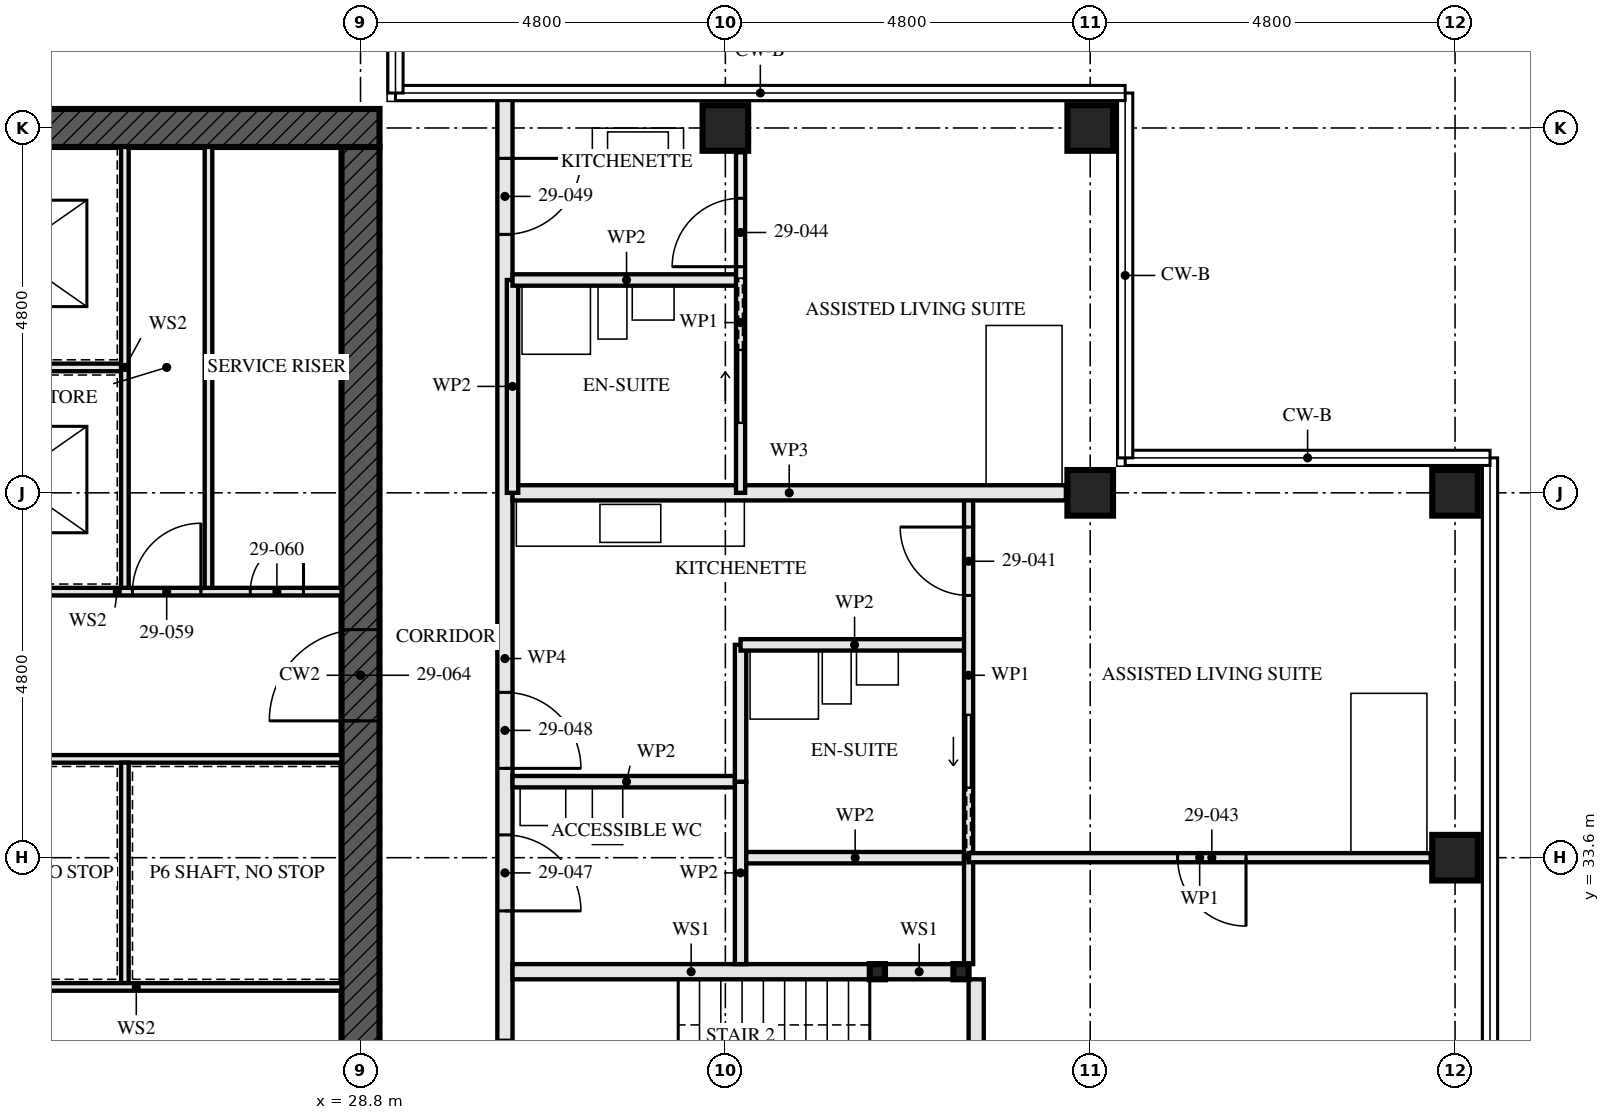
"""IFC4 building model, lengths in metres.
Left out: names, types, materials, properties, quantities, classifications, styles, units other than length and angle.
Written with IfcOpenShell. Run it as: python <this file> out.ifc"""

import sys

from ifc_helpers import new_model, si_unit, direction, frame, frame_2d, origin, origin_2d, place, context, subcontext, project, spatial, rectangle, hollow_rectangle, extrude, element, fill, save


model = new_model("IFC4")
c1 = context("Model", 3, precision=1e-05, world=origin(), true_north=direction((0.0, 1.0)))
c2 = subcontext(c1, "Body", "Model", "MODEL_VIEW")
j1 = project(units=[si_unit("LENGTHUNIT", "METRE"), si_unit("PLANEANGLEUNIT", "RADIAN")], contexts=[c1])
p1 = place(None, origin())
s1 = spatial("IfcSite", under=j1, at=p1, CompositionType="ELEMENT")
p2 = place(p1, origin())
s2 = spatial("IfcBuilding", under=s1, at=p2, CompositionType="ELEMENT")
p3 = place(p2, frame((0.0, 0.0, 108.5)))
s3 = spatial("IfcBuildingStorey", under=s2, at=p3, CompositionType="ELEMENT", Elevation=108.5)
for number, where, z_axis, x_axis in (
    (1, (33.6, 43.2, 0.0), (0.0, 0.0, 1.0), (0.0, 1.0, 0.0)),
    (2, (38.4, 38.4, 0.0), (0.0, 0.0, 1.0), (0.0, 1.0, 0.0)),
    (3, (38.4, 43.2, 0.0), (0.0, 0.0, 1.0), (0.0, 1.0, 0.0)),
    (4, (43.2, 33.6, 0.0), (0.0, 0.0, 1.0), (1.0, 0.0, 0.0)),
    (5, (43.2, 38.4, 0.0), (0.0, 0.0, 1.0), (0.0, 1.0, 0.0)),
):
    element("IfcColumn", number, at=place(p3, frame(where, z_axis=z_axis, x_axis=x_axis)), inside=s3, PredefinedType="COLUMN", context=c2, shape_type="SweptSolid", body=[
        extrude(hollow_rectangle(XDim=0.6, YDim=0.6, WallThickness=0.08, at=origin_2d()), origin(), (0.0, 0.0, 1.0), 3.5),
    ])
p4 = place(p3, frame((29.05, 43.2, -0.17), z_axis=(0.0, 0.0, 1.0), x_axis=(-1.0, 0.0, 0.0)))
e6 = element("IfcWall", 6, at=p4, inside=s3, PredefinedType="SHEAR", context=c2, shape_type="SweptSolid", body=[
    extrude(rectangle(XDim=14.9, YDim=0.5, at=frame_2d((7.45, 0.0))), origin(), (0.0, 0.0, 1.0), 3.5),
])
p5 = place(p4, frame((6.85, 0.0, 0.17)))
e7 = element("IfcOpeningElement", 7, at=p5, cuts=e6, PredefinedType="OPENING", context=c2, shape_type="SweptSolid", body=[
    extrude(rectangle(XDim=1.2, YDim=2.1, at=frame_2d((0.6, 1.05))), frame((0.0, 0.26, 0.0), z_axis=(0.0, -1.0, 0.0), x_axis=(1.0, 0.0, 0.0)), (0.0, 0.0, 1.0), 0.521),
])
p6 = place(p3, frame((28.8, 29.05, -0.17), z_axis=(0.0, 0.0, 1.0), x_axis=(0.0, 1.0, 0.0)))
e8 = element("IfcWall", 8, at=p6, inside=s3, PredefinedType="SHEAR", context=c2, shape_type="SweptSolid", body=[
    extrude(rectangle(XDim=13.9, YDim=0.5, at=frame_2d((6.95, 0.0))), origin(), (0.0, 0.0, 1.0), 3.5),
])
p7 = place(p6, frame((6.35, 0.0, 0.17)))
e9 = element("IfcOpeningElement", 9, at=p7, cuts=e8, PredefinedType="OPENING", context=c2, shape_type="SweptSolid", body=[
    extrude(rectangle(XDim=1.2, YDim=2.1, at=frame_2d((0.6, 1.05))), frame((0.0, 0.26, 0.0), z_axis=(0.0, -1.0, 0.0), x_axis=(1.0, 0.0, 0.0)), (0.0, 0.0, 1.0), 0.521),
])
for number, where, z_axis, x_axis in (
    (10, (36.7, 32.1, 0.0), (0.0, 0.0, 1.0), (1.0, 0.0, 0.0)),
    (11, (35.6, 32.1, 0.0), (0.0, 0.0, 1.0), (1.0, 0.0, 0.0)),
):
    element("IfcColumn", number, at=place(p3, frame(where, z_axis=z_axis, x_axis=x_axis)), inside=s3, PredefinedType="COLUMN", context=c2, shape_type="SweptSolid", body=[
        extrude(hollow_rectangle(XDim=0.2, YDim=0.2, WallThickness=0.008, at=origin_2d()), origin(), (0.0, 0.0, 1.0), 3.33),
    ])
p8 = place(p3, frame((36.6, 32.1, 0.0), z_axis=(0.0, 0.0, 1.0), x_axis=(-1.0, 0.0, 0.0)))
e12 = element("IfcWall", 12, at=p8, inside=s3, PredefinedType="SOLIDWALL", context=c2, shape_type="SweptSolid", body=[
    extrude(rectangle(XDim=0.9, YDim=0.2, at=frame_2d((0.45, 0.0))), origin(), (0.0, 0.0, 1.0), 2.99),
])
p9 = place(p3, frame((35.5, 32.1, 0.0), z_axis=(0.0, 0.0, 1.0), x_axis=(-1.0, 0.0, 0.0)))
e13 = element("IfcWall", 13, at=p9, inside=s3, PredefinedType="SOLIDWALL", context=c2, shape_type="SweptSolid", body=[
    extrude(rectangle(XDim=4.7, YDim=0.2, at=frame_2d((2.35, 0.0))), origin(), (0.0, 0.0, 1.0), 2.99),
])
p10 = place(p3, frame((36.9, 29.4, 0.0), z_axis=(0.0, 0.0, 1.0), x_axis=(0.0, 1.0, 0.0)))
e14 = element("IfcWall", 14, at=p10, inside=s3, PredefinedType="SOLIDWALL", context=c2, shape_type="SweptSolid", body=[
    extrude(rectangle(XDim=2.6, YDim=0.2, at=frame_2d((1.3, 0.0))), origin(), (0.0, 0.0, 1.0), 3.33),
])
p11 = place(p3, frame((33.8, 32.2, 0.0), z_axis=(0.0, 0.0, 1.0), x_axis=(0.0, 1.0, 0.0)))
e15 = element("IfcWall", 15, at=p11, inside=s3, PredefinedType="PARTITIONING", context=c2, shape_type="SweptSolid", body=[
    extrude(rectangle(XDim=2.4, YDim=0.15, at=frame_2d((1.2, 0.0))), origin(), (0.0, 0.0, 1.0), 2.55),
])
for number, where, z_axis, x_axis in (
    (16, (33.8, 34.6, 0.0), (0.0, 0.0, 1.0), (-1.0, 0.0, 0.0)),
    (17, (36.8, 36.4, 0.0), (0.0, 0.0, 1.0), (-1.0, 0.0, 0.0)),
):
    element("IfcWall", number, at=place(p3, frame(where, z_axis=z_axis, x_axis=x_axis)), inside=s3, PredefinedType="PARTITIONING", context=c2, shape_type="SweptSolid", body=[
        extrude(rectangle(XDim=3.0, YDim=0.15, at=frame_2d((1.5, 0.0))), origin(), (0.0, 0.0, 1.0), 3.33),
    ])
p12 = place(p3, frame((33.8, 34.6, 0.0), z_axis=(0.0, 0.0, 1.0), x_axis=(0.0, 1.0, 0.0)))
e18 = element("IfcWall", 18, at=p12, inside=s3, PredefinedType="PARTITIONING", context=c2, shape_type="SweptSolid", body=[
    extrude(rectangle(XDim=1.8, YDim=0.15, at=frame_2d((0.9, 0.0))), origin(), (0.0, 0.0, 1.0), 3.33),
])
p13 = place(p3, frame((36.8, 32.2, 0.0), z_axis=(0.0, 0.0, 1.0), x_axis=(0.0, 1.0, 0.0)))
e19 = element("IfcWall", 19, at=p13, inside=s3, PredefinedType="PARTITIONING", context=c2, shape_type="SweptSolid", body=[
    extrude(rectangle(XDim=1.4, YDim=0.12, at=frame_2d((0.7, 0.0))), origin(), (0.0, 0.0, 1.0), 3.33),
])
p14 = place(p3, frame((36.8, 33.6, 0.0), z_axis=(0.0, 0.0, 1.0), x_axis=(0.0, 1.0, 0.0)))
e20 = element("IfcWall", 20, at=p14, inside=s3, PredefinedType="PARTITIONING", context=c2, shape_type="SweptSolid", body=[
    extrude(rectangle(XDim=4.8, YDim=0.12, at=frame_2d((2.4, 0.0))), origin(), (0.0, 0.0, 1.0), 3.33),
])
p15 = place(p14, frame((3.45, 0.0, 0.0)))
e21 = element("IfcOpeningElement", 21, at=p15, cuts=e20, PredefinedType="OPENING", context=c2, shape_type="SweptSolid", body=[
    extrude(rectangle(XDim=0.9, YDim=2.1, at=frame_2d((0.45, 1.05))), frame((0.0, 0.071, 0.0), z_axis=(0.0, -1.0, 0.0), x_axis=(1.0, 0.0, 0.0)), (0.0, 0.0, 1.0), 0.141),
])
p16 = place(p14, frame((0.925, 0.0, 0.0)))
e22 = element("IfcOpeningElement", 22, at=p16, cuts=e20, PredefinedType="OPENING", context=c2, shape_type="SweptSolid", body=[
    extrude(rectangle(XDim=0.95, YDim=2.1, at=frame_2d((0.475, 1.05))), frame((0.0, 0.071, 0.0), z_axis=(0.0, -1.0, 0.0), x_axis=(1.0, 0.0, 0.0)), (0.0, 0.0, 1.0), 0.141),
])
p17 = place(p3, frame((42.88, 33.6, 0.0), z_axis=(0.0, 0.0, 1.0), x_axis=(-1.0, 0.0, 0.0)))
e23 = element("IfcWall", 23, at=p17, inside=s3, PredefinedType="PARTITIONING", context=c2, shape_type="SweptSolid", body=[
    extrude(rectangle(XDim=6.08, YDim=0.12, at=frame_2d((3.04, 0.0))), origin(), (0.0, 0.0, 1.0), 2.55),
])
p18 = place(p17, frame((2.43, 0.0, 0.0)))
e24 = element("IfcOpeningElement", 24, at=p18, cuts=e23, PredefinedType="OPENING", context=c2, shape_type="SweptSolid", body=[
    extrude(rectangle(XDim=0.9, YDim=2.1, at=frame_2d((0.45, 1.05))), frame((0.0, 0.071, 0.0), z_axis=(0.0, -1.0, 0.0), x_axis=(1.0, 0.0, 0.0)), (0.0, 0.0, 1.0), 0.141),
])
p19 = place(p3, frame((38.08, 38.4, 0.0), z_axis=(0.0, 0.0, 1.0), x_axis=(-1.0, 0.0, 0.0)))
e25 = element("IfcWall", 25, at=p19, inside=s3, PredefinedType="PARTITIONING", context=c2, shape_type="SweptSolid", body=[
    extrude(rectangle(XDim=7.28, YDim=0.2, at=frame_2d((3.64, 0.0))), origin(), (0.0, 0.0, 1.0), 2.55),
])
p20 = place(p3, frame((33.8, 41.2, 0.0), z_axis=(0.0, 0.0, 1.0), x_axis=(-1.0, 0.0, 0.0)))
e26 = element("IfcWall", 26, at=p20, inside=s3, PredefinedType="PARTITIONING", context=c2, shape_type="SweptSolid", body=[
    extrude(rectangle(XDim=3.0, YDim=0.15, at=frame_2d((1.5, 0.0))), origin(), (0.0, 0.0, 1.0), 3.33),
])
p21 = place(p3, frame((30.8, 38.4, 0.0), z_axis=(0.0, 0.0, 1.0), x_axis=(0.0, 1.0, 0.0)))
e27 = element("IfcWall", 27, at=p21, inside=s3, PredefinedType="PARTITIONING", context=c2, shape_type="SweptSolid", body=[
    extrude(rectangle(XDim=2.8, YDim=0.15, at=frame_2d((1.4, 0.0))), origin(), (0.0, 0.0, 1.0), 3.33),
])
p22 = place(p3, frame((33.8, 38.4, 0.0), z_axis=(0.0, 0.0, 1.0), x_axis=(0.0, 1.0, 0.0)))
e28 = element("IfcWall", 28, at=p22, inside=s3, PredefinedType="PARTITIONING", context=c2, shape_type="SweptSolid", body=[
    extrude(rectangle(XDim=4.48, YDim=0.12, at=frame_2d((2.24, 0.0))), origin(), (0.0, 0.0, 1.0), 3.33),
])
p23 = place(p22, frame((2.975, 0.0, 0.0)))
e29 = element("IfcOpeningElement", 29, at=p23, cuts=e28, PredefinedType="OPENING", context=c2, shape_type="SweptSolid", body=[
    extrude(rectangle(XDim=0.9, YDim=2.1, at=frame_2d((0.45, 1.05))), frame((0.0, 0.071, 0.0), z_axis=(0.0, -1.0, 0.0), x_axis=(1.0, 0.0, 0.0)), (0.0, 0.0, 1.0), 0.141),
])
p24 = place(p22, frame((0.925, 0.0, 0.0)))
e30 = element("IfcOpeningElement", 30, at=p24, cuts=e28, PredefinedType="OPENING", context=c2, shape_type="SweptSolid", body=[
    extrude(rectangle(XDim=0.95, YDim=2.1, at=frame_2d((0.475, 1.05))), frame((0.0, 0.071, 0.0), z_axis=(0.0, -1.0, 0.0), x_axis=(1.0, 0.0, 0.0)), (0.0, 0.0, 1.0), 0.141),
])
p25 = place(p3, frame((30.7, 28.8, 0.0), z_axis=(0.0, 0.0, 1.0), x_axis=(0.0, 1.0, 0.0)))
e31 = element("IfcWall", 31, at=p25, inside=s3, PredefinedType="PARTITIONING", context=c2, shape_type="SweptSolid", body=[
    extrude(rectangle(XDim=14.84, YDim=0.2, at=frame_2d((7.42, 0.0))), origin(), (0.0, 0.0, 1.0), 2.32),
])
p26 = place(p25, frame((1.4, 0.0, 0.0)))
e32 = element("IfcOpeningElement", 32, at=p26, cuts=e31, PredefinedType="OPENING", context=c2, shape_type="SweptSolid", body=[
    extrude(rectangle(XDim=1.0, YDim=2.1, at=frame_2d((0.5, 1.05))), frame((0.0, 0.111, 0.0), z_axis=(0.0, -1.0, 0.0), x_axis=(1.0, 0.0, 0.0)), (0.0, 0.0, 1.0), 0.221),
])
p27 = place(p25, frame((4.1, 0.0, 0.0)))
e33 = element("IfcOpeningElement", 33, at=p27, cuts=e31, PredefinedType="OPENING", context=c2, shape_type="SweptSolid", body=[
    extrude(rectangle(XDim=1.0, YDim=2.1, at=frame_2d((0.5, 1.05))), frame((0.0, 0.111, 0.0), z_axis=(0.0, -1.0, 0.0), x_axis=(1.0, 0.0, 0.0)), (0.0, 0.0, 1.0), 0.221),
])
p28 = place(p25, frame((5.975, 0.0, 0.0)))
e34 = element("IfcOpeningElement", 34, at=p28, cuts=e31, PredefinedType="OPENING", context=c2, shape_type="SweptSolid", body=[
    extrude(rectangle(XDim=1.0, YDim=2.1, at=frame_2d((0.5, 1.05))), frame((0.0, 0.111, 0.0), z_axis=(0.0, -1.0, 0.0), x_axis=(1.0, 0.0, 0.0)), (0.0, 0.0, 1.0), 0.221),
])
p29 = place(p25, frame((13.0, 0.0, 0.0)))
e35 = element("IfcOpeningElement", 35, at=p29, cuts=e31, PredefinedType="OPENING", context=c2, shape_type="SweptSolid", body=[
    extrude(rectangle(XDim=1.0, YDim=2.1, at=frame_2d((0.5, 1.05))), frame((0.0, 0.111, 0.0), z_axis=(0.0, -1.0, 0.0), x_axis=(1.0, 0.0, 0.0)), (0.0, 0.0, 1.0), 0.221),
])
p30 = place(p3, frame((26.8, 37.15, 0.0), z_axis=(0.0, 0.0, 1.0), x_axis=(0.0, 1.0, 0.0)))
e36 = element("IfcWall", 36, at=p30, inside=s3, PredefinedType="SOLIDWALL", context=c2, shape_type="SweptSolid", body=[
    extrude(rectangle(XDim=5.8, YDim=0.1, at=frame_2d((2.9, 0.0))), origin(), (0.0, 0.0, 1.0), 3.33),
])
p31 = place(p3, frame((23.05, 34.9, 0.0), z_axis=(0.0, 0.0, 1.0), x_axis=(1.0, 0.0, 0.0)))
e37 = element("IfcWall", 37, at=p31, inside=s3, PredefinedType="SOLIDWALL", context=c2, shape_type="SweptSolid", body=[
    extrude(rectangle(XDim=5.5, YDim=0.1, at=frame_2d((2.75, 0.0))), origin(), (0.0, 0.0, 1.0), 3.33),
])
p32 = place(p3, frame((22.65, 37.1, 0.0), z_axis=(0.0, 0.0, 1.0), x_axis=(1.0, 0.0, 0.0)))
e38 = element("IfcWall", 38, at=p32, inside=s3, PredefinedType="SOLIDWALL", context=c2, shape_type="SweptSolid", body=[
    extrude(rectangle(XDim=5.9, YDim=0.1, at=frame_2d((2.95, 0.0))), origin(), (0.0, 0.0, 1.0), 3.33),
])
p33 = place(p32, frame((3.15, 0.0, 0.0)))
e39 = element("IfcOpeningElement", 39, at=p33, cuts=e38, PredefinedType="OPENING", context=c2, shape_type="SweptSolid", body=[
    extrude(rectangle(XDim=0.9, YDim=2.1, at=frame_2d((0.45, 1.05))), frame((0.0, 0.061, 0.0), z_axis=(0.0, -1.0, 0.0), x_axis=(1.0, 0.0, 0.0)), (0.0, 0.0, 1.0), 0.121),
])
p34 = place(p32, frame((4.7, 0.0, 0.0)))
e40 = element("IfcOpeningElement", 40, at=p34, cuts=e38, PredefinedType="OPENING", context=c2, shape_type="SweptSolid", body=[
    extrude(rectangle(XDim=0.7, YDim=2.1, at=frame_2d((0.35, 1.05))), frame((0.0, 0.061, 0.0), z_axis=(0.0, -1.0, 0.0), x_axis=(1.0, 0.0, 0.0)), (0.0, 0.0, 1.0), 0.121),
])
p35 = place(p3, frame((22.75, 40.05, 0.0), z_axis=(0.0, 0.0, 1.0), x_axis=(1.0, 0.0, 0.0)))
e41 = element("IfcWall", 41, at=p35, inside=s3, PredefinedType="SOLIDWALL", context=c2, shape_type="SweptSolid", body=[
    extrude(rectangle(XDim=2.9, YDim=0.1, at=frame_2d((1.45, 0.0))), origin(), (0.0, 0.0, 1.0), 3.33),
])
p36 = place(p3, frame((25.7, 37.15, 0.0), z_axis=(0.0, 0.0, 1.0), x_axis=(0.0, 1.0, 0.0)))
e42 = element("IfcWall", 42, at=p36, inside=s3, PredefinedType="SOLIDWALL", context=c2, shape_type="SweptSolid", body=[
    extrude(rectangle(XDim=5.8, YDim=0.1, at=frame_2d((2.9, 0.0))), origin(), (0.0, 0.0, 1.0), 3.33),
])
p37 = place(p3, frame((25.7, 31.95, 0.0), z_axis=(0.0, 0.0, 1.0), x_axis=(0.0, 1.0, 0.0)))
e43 = element("IfcWall", 43, at=p37, inside=s3, PredefinedType="SOLIDWALL", context=c2, shape_type="SweptSolid", body=[
    extrude(rectangle(XDim=2.9, YDim=0.1, at=frame_2d((1.45, 0.0))), origin(), (0.0, 0.0, 1.0), 3.33),
])
p38 = place(p3, frame((23.15, 31.9, 0.0), z_axis=(0.0, 0.0, 1.0), x_axis=(1.0, 0.0, 0.0)))
e44 = element("IfcWall", 44, at=p38, inside=s3, PredefinedType="SOLIDWALL", context=c2, shape_type="SweptSolid", body=[
    extrude(rectangle(XDim=5.4, YDim=0.1, at=frame_2d((2.7, 0.0))), origin(), (0.0, 0.0, 1.0), 3.33),
])
p39 = place(p3, frame((36.74, 33.6, 0.0), z_axis=(0.0, 0.0, 1.0), x_axis=(-1.0, 0.0, 0.0)))
e45 = element("IfcWall", 45, at=p39, inside=s3, PredefinedType="PARTITIONING", context=c2, shape_type="SweptSolid", body=[
    extrude(rectangle(XDim=2.865, YDim=0.15, at=frame_2d((1.433, 0.0))), origin(), (0.0, 0.0, 1.0), 2.55),
])
p40 = place(p15, origin())
e46 = element("IfcDoor", 46, at=p40, inside=s3, OperationType="SINGLE_SWING_LEFT", PredefinedType="DOOR", context=c2, shape_type="SweptSolid", body=[
    extrude(rectangle(XDim=0.9, YDim=2.1, at=frame_2d((0.45, 1.05))), frame((0.0, 0.022, 0.0), z_axis=(0.0, -1.0, 0.0), x_axis=(1.0, 0.0, 0.0)), (0.0, 0.0, 1.0), 0.044),
])
fill(e21, e46)
p41 = place(p16, origin())
e47 = element("IfcDoor", 47, at=p41, inside=s3, OperationType="SLIDING_TO_RIGHT", PredefinedType="DOOR", context=c2, shape_type="SweptSolid", body=[
    extrude(rectangle(XDim=0.95, YDim=2.1, at=frame_2d((0.475, 1.05))), frame((0.0, 0.022, 0.0), z_axis=(0.0, -1.0, 0.0), x_axis=(1.0, 0.0, 0.0)), (0.0, 0.0, 1.0), 0.044),
])
fill(e22, e47)
p42 = place(p18, origin())
e48 = element("IfcDoor", 48, at=p42, inside=s3, OperationType="SINGLE_SWING_RIGHT", PredefinedType="DOOR", context=c2, shape_type="SweptSolid", body=[
    extrude(rectangle(XDim=0.9, YDim=2.1, at=frame_2d((0.45, 1.05))), frame((0.0, 0.022, 0.0), z_axis=(0.0, -1.0, 0.0), x_axis=(1.0, 0.0, 0.0)), (0.0, 0.0, 1.0), 0.044),
])
fill(e24, e48)
p43 = place(p23, origin())
e49 = element("IfcDoor", 49, at=p43, inside=s3, OperationType="SINGLE_SWING_RIGHT", PredefinedType="DOOR", context=c2, shape_type="SweptSolid", body=[
    extrude(rectangle(XDim=0.9, YDim=2.1, at=frame_2d((0.45, 1.05))), frame((0.0, 0.022, 0.0), z_axis=(0.0, -1.0, 0.0), x_axis=(1.0, 0.0, 0.0)), (0.0, 0.0, 1.0), 0.044),
])
fill(e29, e49)
p44 = place(p24, origin())
e50 = element("IfcDoor", 50, at=p44, inside=s3, OperationType="SLIDING_TO_LEFT", PredefinedType="DOOR", context=c2, shape_type="SweptSolid", body=[
    extrude(rectangle(XDim=0.95, YDim=2.1, at=frame_2d((0.475, 1.05))), frame((0.0, 0.022, 0.0), z_axis=(0.0, -1.0, 0.0), x_axis=(1.0, 0.0, 0.0)), (0.0, 0.0, 1.0), 0.044),
])
fill(e30, e50)
p45 = place(p27, frame((1.0, 0.0, 0.0), z_axis=(0.0, 0.0, 1.0), x_axis=(-1.0, 0.0, 0.0)))
e51 = element("IfcDoor", 51, at=p45, inside=s3, OperationType="SINGLE_SWING_LEFT", PredefinedType="DOOR", context=c2, shape_type="SweptSolid", body=[
    extrude(rectangle(XDim=1.0, YDim=2.1, at=frame_2d((0.5, 1.05))), frame((0.0, 0.027, 0.0), z_axis=(0.0, -1.0, 0.0), x_axis=(1.0, 0.0, 0.0)), (0.0, 0.0, 1.0), 0.054),
])
fill(e33, e51)
p46 = place(p28, frame((1.0, 0.0, 0.0), z_axis=(0.0, 0.0, 1.0), x_axis=(-1.0, 0.0, 0.0)))
e52 = element("IfcDoor", 52, at=p46, inside=s3, OperationType="SINGLE_SWING_LEFT", PredefinedType="DOOR", context=c2, shape_type="SweptSolid", body=[
    extrude(rectangle(XDim=1.0, YDim=2.1, at=frame_2d((0.5, 1.05))), frame((0.0, 0.027, 0.0), z_axis=(0.0, -1.0, 0.0), x_axis=(1.0, 0.0, 0.0)), (0.0, 0.0, 1.0), 0.054),
])
fill(e34, e52)
p47 = place(p29, frame((1.0, 0.0, 0.0), z_axis=(0.0, 0.0, 1.0), x_axis=(-1.0, 0.0, 0.0)))
e53 = element("IfcDoor", 53, at=p47, inside=s3, OperationType="SINGLE_SWING_RIGHT", PredefinedType="DOOR", context=c2, shape_type="SweptSolid", body=[
    extrude(rectangle(XDim=1.0, YDim=2.1, at=frame_2d((0.5, 1.05))), frame((0.0, 0.027, 0.0), z_axis=(0.0, -1.0, 0.0), x_axis=(1.0, 0.0, 0.0)), (0.0, 0.0, 1.0), 0.054),
])
fill(e35, e53)
p48 = place(p33, origin())
e54 = element("IfcDoor", 54, at=p48, inside=s3, OperationType="SINGLE_SWING_LEFT", PredefinedType="DOOR", context=c2, shape_type="SweptSolid", body=[
    extrude(rectangle(XDim=0.9, YDim=2.1, at=frame_2d((0.45, 1.05))), frame((0.0, 0.027, 0.0), z_axis=(0.0, -1.0, 0.0), x_axis=(1.0, 0.0, 0.0)), (0.0, 0.0, 1.0), 0.054),
])
fill(e39, e54)
p49 = place(p34, origin())
e55 = element("IfcDoor", 55, at=p49, inside=s3, OperationType="SINGLE_SWING_LEFT", PredefinedType="DOOR", context=c2, shape_type="SweptSolid", body=[
    extrude(rectangle(XDim=0.7, YDim=2.1, at=frame_2d((0.35, 1.05))), frame((0.0, 0.027, 0.0), z_axis=(0.0, -1.0, 0.0), x_axis=(1.0, 0.0, 0.0)), (0.0, 0.0, 1.0), 0.054),
])
fill(e40, e55)
p50 = place(p7, origin())
e56 = element("IfcDoor", 56, at=p50, inside=s3, OperationType="SINGLE_SWING_LEFT", PredefinedType="DOOR", context=c2, shape_type="SweptSolid", body=[
    extrude(rectangle(XDim=1.2, YDim=2.1, at=frame_2d((0.6, 1.05))), frame((0.0, 0.027, 0.0), z_axis=(0.0, -1.0, 0.0), x_axis=(1.0, 0.0, 0.0)), (0.0, 0.0, 1.0), 0.054),
])
fill(e9, e56)
save(model, sys.argv[1])
